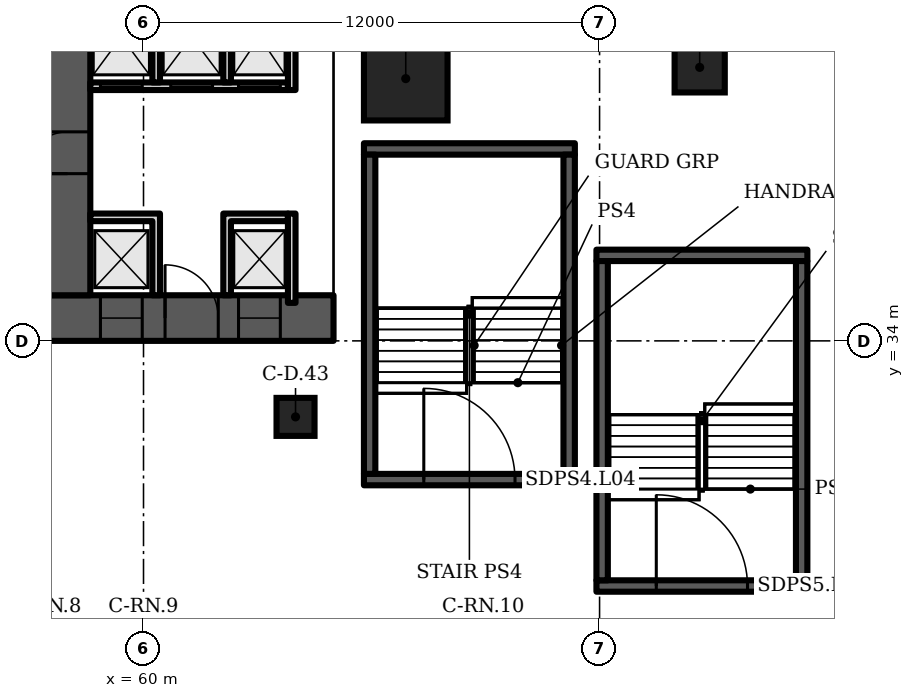
"""IFC4 building model, lengths in metres.
Left out: names, types, materials, properties, quantities, classifications, styles, units other than length and angle.
Written with IfcOpenShell. Run it as: python <this file> out.ifc"""

import sys

from ifc_helpers import new_model, si_unit, direction, frame, frame_2d, origin, origin_2d, place, context, subcontext, project, spatial, polyline, rectangle, outline, extrude, element, fill, save


model = new_model("IFC4")
c1 = context("Model", 3, precision=1e-05, world=origin(), true_north=direction((0.0, 1.0)))
c2 = subcontext(c1, "Body", "Model", "MODEL_VIEW")
j1 = project(units=[si_unit("LENGTHUNIT", "METRE"), si_unit("PLANEANGLEUNIT", "RADIAN")], contexts=[c1])
p1 = place(None, origin())
s1 = spatial("IfcSite", under=j1, at=p1, CompositionType="ELEMENT")
p2 = place(p1, origin())
s2 = spatial("IfcBuilding", under=s1, at=p2, CompositionType="ELEMENT")
p3 = place(p2, frame((0.0, 0.0, 27.5)))
s3 = spatial("IfcBuildingStorey", under=s2, at=p3, CompositionType="ELEMENT", Elevation=27.5)
p4 = place(p3, frame((66.9, 40.9, 0.0), z_axis=(0.0, 0.0, 1.0), x_axis=(1.0, 0.0, 0.0)))
e1 = element("IfcColumn", 1, at=p4, inside=s3, PredefinedType="COLUMN", context=c2, shape_type="SweptSolid", body=[
    extrude(rectangle(XDim=2.2, YDim=2.2, at=origin_2d()), origin(), (0.0, 0.0, 1.0), 5.5),
])
p5 = place(p3, frame((74.634, 41.196, 0.0), z_axis=(0.0, 0.0, 1.0), x_axis=(1.0, 0.0, 0.0)))
e2 = element("IfcColumn", 2, at=p5, inside=s3, PredefinedType="COLUMN", context=c2, shape_type="SweptSolid", body=[
    extrude(rectangle(XDim=1.32, YDim=1.32, at=origin_2d()), origin(), (0.0, 0.0, 1.0), 5.5),
])
p6 = place(p3, frame((64.0, 32.0, 0.0), z_axis=(0.0, 0.0, 1.0), x_axis=(1.0, 0.0, 0.0)))
e3 = element("IfcColumn", 3, at=p6, inside=s3, PredefinedType="COLUMN", context=c2, shape_type="SweptSolid", body=[
    extrude(rectangle(XDim=1.0, YDim=1.0, at=origin_2d()), origin(), (0.0, 0.0, 1.0), 5.5),
])
p7 = place(p3, frame((9.0, 34.6, 0.0), z_axis=(0.0, 0.0, 1.0), x_axis=(1.0, 0.0, 0.0)))
e4 = element("IfcWall", 4, at=p7, inside=s3, PredefinedType="SHEAR", context=c2, shape_type="SweptSolid", body=[
    extrude(rectangle(XDim=56.0, YDim=1.2, at=frame_2d((28.0, 0.0))), origin(), (0.0, 0.0, 1.0), 5.2),
])
p8 = place(p7, frame((3.3, 0.0, 0.0)))
e5 = element("IfcOpeningElement", 5, at=p8, cuts=e4, PredefinedType="OPENING", context=c2, shape_type="SweptSolid", body=[
    extrude(rectangle(XDim=1.0, YDim=2.1, at=frame_2d((0.5, 1.05))), frame((0.0, 0.61, 0.0), z_axis=(0.0, -1.0, 0.0), x_axis=(1.0, 0.0, 0.0)), (0.0, 0.0, 1.0), 1.22),
])
p9 = place(p7, frame((7.867, 0.0, 0.0)))
e6 = element("IfcOpeningElement", 6, at=p9, cuts=e4, PredefinedType="OPENING", context=c2, shape_type="SweptSolid", body=[
    extrude(rectangle(XDim=1.1, YDim=2.1, at=frame_2d((0.55, 1.05))), frame((0.0, 0.61, 0.0), z_axis=(0.0, -1.0, 0.0), x_axis=(1.0, 0.0, 0.0)), (0.0, 0.0, 1.0), 1.22),
])
p10 = place(p7, frame((12.033, 0.0, 0.0)))
e7 = element("IfcOpeningElement", 7, at=p10, cuts=e4, PredefinedType="OPENING", context=c2, shape_type="SweptSolid", body=[
    extrude(rectangle(XDim=1.1, YDim=2.1, at=frame_2d((0.55, 1.05))), frame((0.0, 0.61, 0.0), z_axis=(0.0, -1.0, 0.0), x_axis=(1.0, 0.0, 0.0)), (0.0, 0.0, 1.0), 1.22),
])
p11 = place(p7, frame((9.8, 0.0, 0.0)))
e8 = element("IfcOpeningElement", 8, at=p11, cuts=e4, PredefinedType="OPENING", context=c2, shape_type="SweptSolid", body=[
    extrude(rectangle(XDim=1.4, YDim=2.1, at=frame_2d((0.7, 1.05))), frame((0.0, 0.61, 0.0), z_axis=(0.0, -1.0, 0.0), x_axis=(1.0, 0.0, 0.0)), (0.0, 0.0, 1.0), 1.22),
])
p12 = place(p7, frame((14.65, 0.0, 0.0)))
e9 = element("IfcOpeningElement", 9, at=p12, cuts=e4, PredefinedType="OPENING", context=c2, shape_type="SweptSolid", body=[
    extrude(rectangle(XDim=1.2, YDim=2.1, at=frame_2d((0.6, 1.05))), frame((0.0, 0.61, 0.0), z_axis=(0.0, -1.0, 0.0), x_axis=(1.0, 0.0, 0.0)), (0.0, 0.0, 1.0), 1.22),
])
p13 = place(p7, frame((21.867, 0.0, 0.0)))
e10 = element("IfcOpeningElement", 10, at=p13, cuts=e4, PredefinedType="OPENING", context=c2, shape_type="SweptSolid", body=[
    extrude(rectangle(XDim=1.1, YDim=2.1, at=frame_2d((0.55, 1.05))), frame((0.0, 0.61, 0.0), z_axis=(0.0, -1.0, 0.0), x_axis=(1.0, 0.0, 0.0)), (0.0, 0.0, 1.0), 1.22),
])
p14 = place(p7, frame((26.033, 0.0, 0.0)))
e11 = element("IfcOpeningElement", 11, at=p14, cuts=e4, PredefinedType="OPENING", context=c2, shape_type="SweptSolid", body=[
    extrude(rectangle(XDim=1.1, YDim=2.1, at=frame_2d((0.55, 1.05))), frame((0.0, 0.61, 0.0), z_axis=(0.0, -1.0, 0.0), x_axis=(1.0, 0.0, 0.0)), (0.0, 0.0, 1.0), 1.22),
])
p15 = place(p7, frame((23.8, 0.0, 0.0)))
e12 = element("IfcOpeningElement", 12, at=p15, cuts=e4, PredefinedType="OPENING", context=c2, shape_type="SweptSolid", body=[
    extrude(rectangle(XDim=1.4, YDim=2.1, at=frame_2d((0.7, 1.05))), frame((0.0, 0.61, 0.0), z_axis=(0.0, -1.0, 0.0), x_axis=(1.0, 0.0, 0.0)), (0.0, 0.0, 1.0), 1.22),
])
p16 = place(p7, frame((28.867, 0.0, 0.0)))
e13 = element("IfcOpeningElement", 13, at=p16, cuts=e4, PredefinedType="OPENING", context=c2, shape_type="SweptSolid", body=[
    extrude(rectangle(XDim=1.1, YDim=2.1, at=frame_2d((0.55, 1.05))), frame((0.0, 0.61, 0.0), z_axis=(0.0, -1.0, 0.0), x_axis=(1.0, 0.0, 0.0)), (0.0, 0.0, 1.0), 1.22),
])
p17 = place(p7, frame((33.033, 0.0, 0.0)))
e14 = element("IfcOpeningElement", 14, at=p17, cuts=e4, PredefinedType="OPENING", context=c2, shape_type="SweptSolid", body=[
    extrude(rectangle(XDim=1.1, YDim=2.1, at=frame_2d((0.55, 1.05))), frame((0.0, 0.61, 0.0), z_axis=(0.0, -1.0, 0.0), x_axis=(1.0, 0.0, 0.0)), (0.0, 0.0, 1.0), 1.22),
])
p18 = place(p7, frame((40.15, 0.0, 0.0)))
e15 = element("IfcOpeningElement", 15, at=p18, cuts=e4, PredefinedType="OPENING", context=c2, shape_type="SweptSolid", body=[
    extrude(rectangle(XDim=1.2, YDim=2.1, at=frame_2d((0.6, 1.05))), frame((0.0, 0.61, 0.0), z_axis=(0.0, -1.0, 0.0), x_axis=(1.0, 0.0, 0.0)), (0.0, 0.0, 1.0), 1.22),
])
p19 = place(p7, frame((44.8, 0.0, 0.0)))
e16 = element("IfcOpeningElement", 16, at=p19, cuts=e4, PredefinedType="OPENING", context=c2, shape_type="SweptSolid", body=[
    extrude(rectangle(XDim=1.4, YDim=2.1, at=frame_2d((0.7, 1.05))), frame((0.0, 0.61, 0.0), z_axis=(0.0, -1.0, 0.0), x_axis=(1.0, 0.0, 0.0)), (0.0, 0.0, 1.0), 1.22),
])
p20 = place(p7, frame((49.867, 0.0, 0.0)))
e17 = element("IfcOpeningElement", 17, at=p20, cuts=e4, PredefinedType="OPENING", context=c2, shape_type="SweptSolid", body=[
    extrude(rectangle(XDim=1.1, YDim=2.1, at=frame_2d((0.55, 1.05))), frame((0.0, 0.61, 0.0), z_axis=(0.0, -1.0, 0.0), x_axis=(1.0, 0.0, 0.0)), (0.0, 0.0, 1.0), 1.22),
])
p21 = place(p7, frame((53.5, 0.0, 0.0)))
e18 = element("IfcOpeningElement", 18, at=p21, cuts=e4, PredefinedType="OPENING", context=c2, shape_type="SweptSolid", body=[
    extrude(rectangle(XDim=1.1, YDim=2.1, at=frame_2d((0.55, 1.05))), frame((0.0, 0.61, 0.0), z_axis=(0.0, -1.0, 0.0), x_axis=(1.0, 0.0, 0.0)), (0.0, 0.0, 1.0), 1.22),
])
p22 = place(p7, frame((51.567, 0.0, 0.0)))
e19 = element("IfcOpeningElement", 19, at=p22, cuts=e4, PredefinedType="OPENING", context=c2, shape_type="SweptSolid", body=[
    extrude(rectangle(XDim=1.4, YDim=2.1, at=frame_2d((0.7, 1.05))), frame((0.0, 0.61, 0.0), z_axis=(0.0, -1.0, 0.0), x_axis=(1.0, 0.0, 0.0)), (0.0, 0.0, 1.0), 1.22),
])
p23 = place(p3, frame((58.0, 35.2, 0.0), z_axis=(0.0, 0.0, 1.0), x_axis=(0.0, 1.0, 0.0)))
e20 = element("IfcWall", 20, at=p23, inside=s3, PredefinedType="SHEAR", context=c2, shape_type="SweptSolid", body=[
    extrude(rectangle(XDim=12.8, YDim=1.2, at=frame_2d((6.4, 0.0))), origin(), (0.0, 0.0, 1.0), 5.2),
])
p24 = place(p23, frame((10.134, 0.0, 0.0)))
e21 = element("IfcOpeningElement", 21, at=p24, cuts=e20, PredefinedType="OPENING", context=c2, shape_type="SweptSolid", body=[
    extrude(rectangle(XDim=1.0, YDim=2.1, at=frame_2d((0.5, 1.05))), frame((0.0, 0.61, 0.0), z_axis=(0.0, -1.0, 0.0), x_axis=(1.0, 0.0, 0.0)), (0.0, 0.0, 1.0), 1.22),
])
p25 = place(p23, frame((3.2, 0.0, 0.0)))
e22 = element("IfcOpeningElement", 22, at=p25, cuts=e20, PredefinedType="OPENING", context=c2, shape_type="SweptSolid", body=[
    extrude(rectangle(XDim=1.1, YDim=2.1, at=frame_2d((0.55, 1.05))), frame((0.0, 0.61, 0.0), z_axis=(0.0, -1.0, 0.0), x_axis=(1.0, 0.0, 0.0)), (0.0, 0.0, 1.0), 1.22),
])
p26 = place(p3, frame((58.6, 40.7, 0.0), z_axis=(0.0, 0.0, 1.0), x_axis=(1.0, 0.0, 0.0)))
e23 = element("IfcWall", 23, at=p26, inside=s3, PredefinedType="PARTITIONING", context=c2, shape_type="SweptSolid", body=[
    extrude(rectangle(XDim=5.2, YDim=0.2, at=frame_2d((2.6, 0.0))), origin(), (0.0, 0.0, 1.0), 5.2),
])
p27 = place(p26, frame((0.267, 0.0, 0.0)))
e24 = element("IfcOpeningElement", 24, at=p27, cuts=e23, PredefinedType="OPENING", context=c2, shape_type="SweptSolid", body=[
    extrude(rectangle(XDim=1.1, YDim=2.1, at=frame_2d((0.55, 1.05))), frame((0.0, 0.11, 0.0), z_axis=(0.0, -1.0, 0.0), x_axis=(1.0, 0.0, 0.0)), (0.0, 0.0, 1.0), 0.22),
])
p28 = place(p26, frame((2.117, 0.0, 0.0)))
e25 = element("IfcOpeningElement", 25, at=p28, cuts=e23, PredefinedType="OPENING", context=c2, shape_type="SweptSolid", body=[
    extrude(rectangle(XDim=1.1, YDim=2.1, at=frame_2d((0.55, 1.05))), frame((0.0, 0.11, 0.0), z_axis=(0.0, -1.0, 0.0), x_axis=(1.0, 0.0, 0.0)), (0.0, 0.0, 1.0), 0.22),
])
p29 = place(p26, frame((3.9, 0.0, 0.0)))
e26 = element("IfcOpeningElement", 26, at=p29, cuts=e23, PredefinedType="OPENING", context=c2, shape_type="SweptSolid", body=[
    extrude(rectangle(XDim=1.1, YDim=2.1, at=frame_2d((0.55, 1.05))), frame((0.0, 0.11, 0.0), z_axis=(0.0, -1.0, 0.0), x_axis=(1.0, 0.0, 0.0)), (0.0, 0.0, 1.0), 0.22),
])
p30 = place(p3, frame((0.0, 0.0, -0.0)))
e27 = element("IfcWall", 27, at=p30, inside=s3, PredefinedType="PARTITIONING", context=c2, shape_type="SweptSolid", body=[
    extrude(outline(polyline([(60.233, 37.15), (58.6, 37.15), (58.6, 37.35), (60.233, 37.35), (60.433, 37.35), (60.433, 35.2), (60.233, 35.2), (60.233, 37.15)])), origin(), (0.0, 0.0, 1.0), 5.2),
])
p31 = place(p3, frame((0.0, 0.0, -0.0)))
e28 = element("IfcWall", 28, at=p31, inside=s3, PredefinedType="PARTITIONING", context=c2, shape_type="SweptSolid", body=[
    extrude(outline(polyline([(62.1, 37.35), (62.3, 37.35), (63.8, 37.35), (63.8, 37.15), (62.3, 37.15), (62.3, 35.2), (62.1, 35.2), (62.1, 37.35)])), origin(), (0.0, 0.0, 1.0), 5.2),
])
p32 = place(p3, frame((0.0, 0.0, -0.0)))
e29 = element("IfcWall", 29, at=p32, inside=s3, PredefinedType="PARTITIONING", context=c2, shape_type="SweptSolid", body=[
    extrude(outline(polyline([(60.433, 40.8), (60.233, 40.8), (60.233, 43.8), (58.6, 43.8), (58.6, 44.0), (63.8, 44.0), (63.8, 43.8), (62.3, 43.8), (62.3, 40.8), (62.1, 40.8), (62.1, 43.8), (60.433, 43.8), (60.433, 40.8)])), origin(), (0.0, 0.0, 1.0), 5.2),
])
p33 = place(p3, frame((63.9, 35.0, 0.0), z_axis=(0.0, 0.0, 1.0), x_axis=(0.0, 1.0, 0.0)))
e30 = element("IfcWall", 30, at=p33, inside=s3, PredefinedType="PARTITIONING", context=c2, shape_type="SweptSolid", body=[
    extrude(rectangle(XDim=2.35, YDim=0.2, at=frame_2d((1.175, 0.0))), origin(), (0.0, 0.0, 1.0), 5.2),
])
p34 = place(p3, frame((63.9, 40.6, 0.0), z_axis=(0.0, 0.0, 1.0), x_axis=(0.0, 1.0, 0.0)))
e31 = element("IfcWall", 31, at=p34, inside=s3, PredefinedType="PARTITIONING", context=c2, shape_type="SweptSolid", body=[
    extrude(rectangle(XDim=3.4, YDim=0.2, at=frame_2d((1.7, 0.0))), origin(), (0.0, 0.0, 1.0), 5.2),
])
p35 = place(p3, frame((65.8, 30.35, 0.0), z_axis=(0.0, 0.0, 1.0), x_axis=(1.0, 0.0, 0.0)))
e32 = element("IfcWall", 32, at=p35, inside=s3, PredefinedType="SHEAR", context=c2, shape_type="SweptSolid", body=[
    extrude(rectangle(XDim=5.55, YDim=0.3, at=frame_2d((2.775, 0.0))), origin(), (0.0, 0.0, 1.0), 5.2),
])
p36 = place(p35, frame((1.575, 0.0, 0.0)))
e33 = element("IfcOpeningElement", 33, at=p36, cuts=e32, PredefinedType="OPENING", context=c2, shape_type="SweptSolid", body=[
    extrude(rectangle(XDim=2.4, YDim=2.1, at=frame_2d((1.2, 1.05))), frame((0.0, 0.16, 0.0), z_axis=(0.0, -1.0, 0.0), x_axis=(1.0, 0.0, 0.0)), (0.0, 0.0, 1.0), 0.32),
])
p37 = place(p3, frame((65.8, 39.05, 0.0), z_axis=(0.0, 0.0, 1.0), x_axis=(1.0, 0.0, 0.0)))
e34 = element("IfcWall", 34, at=p37, inside=s3, PredefinedType="SHEAR", context=c2, shape_type="SweptSolid", body=[
    extrude(rectangle(XDim=5.55, YDim=0.3, at=frame_2d((2.775, 0.0))), origin(), (0.0, 0.0, 1.0), 5.2),
])
for number, where, z_axis, x_axis in (
    (35, (65.95, 30.5, 0.0), (0.0, 0.0, 1.0), (0.0, 1.0, 0.0)),
    (36, (71.2, 30.5, 0.0), (0.0, 0.0, 1.0), (0.0, 1.0, 0.0)),
):
    element("IfcWall", number, at=place(p3, frame(where, z_axis=z_axis, x_axis=x_axis)), inside=s3, PredefinedType="SHEAR", context=c2, shape_type="SweptSolid", body=[
        extrude(rectangle(XDim=8.4, YDim=0.3, at=frame_2d((4.2, 0.0))), origin(), (0.0, 0.0, 1.0), 5.2),
    ])
p38 = place(p3, frame((71.917, 27.55, 0.0), z_axis=(0.0, 0.0, 1.0), x_axis=(1.0, 0.0, 0.0)))
e37 = element("IfcWall", 37, at=p38, inside=s3, PredefinedType="SHEAR", context=c2, shape_type="SweptSolid", body=[
    extrude(rectangle(XDim=5.55, YDim=0.3, at=frame_2d((2.775, 0.0))), origin(), (0.0, 0.0, 1.0), 5.2),
])
p39 = place(p38, frame((1.575, 0.0, 0.0)))
e38 = element("IfcOpeningElement", 38, at=p39, cuts=e37, PredefinedType="OPENING", context=c2, shape_type="SweptSolid", body=[
    extrude(rectangle(XDim=2.4, YDim=2.1, at=frame_2d((1.2, 1.05))), frame((0.0, 0.16, 0.0), z_axis=(0.0, -1.0, 0.0), x_axis=(1.0, 0.0, 0.0)), (0.0, 0.0, 1.0), 0.32),
])
p40 = place(p3, frame((71.917, 36.25, 0.0), z_axis=(0.0, 0.0, 1.0), x_axis=(1.0, 0.0, 0.0)))
e39 = element("IfcWall", 39, at=p40, inside=s3, PredefinedType="SHEAR", context=c2, shape_type="SweptSolid", body=[
    extrude(rectangle(XDim=5.55, YDim=0.3, at=frame_2d((2.775, 0.0))), origin(), (0.0, 0.0, 1.0), 5.2),
])
for number, where, z_axis, x_axis in (
    (40, (72.067, 27.7, 0.0), (0.0, 0.0, 1.0), (0.0, 1.0, 0.0)),
    (41, (77.317, 27.7, 0.0), (0.0, 0.0, 1.0), (0.0, 1.0, 0.0)),
):
    element("IfcWall", number, at=place(p3, frame(where, z_axis=z_axis, x_axis=x_axis)), inside=s3, PredefinedType="SHEAR", context=c2, shape_type="SweptSolid", body=[
        extrude(rectangle(XDim=8.4, YDim=0.3, at=frame_2d((4.2, 0.0))), origin(), (0.0, 0.0, 1.0), 5.2),
    ])
p41 = place(p20, origin())
e42 = element("IfcDoor", 42, at=p41, inside=s3, OperationType="DOUBLE_DOOR_SLIDING", PredefinedType="DOOR", context=c2, shape_type="SweptSolid", body=[
    extrude(rectangle(XDim=1.1, YDim=2.1, at=frame_2d((0.55, 1.05))), frame((0.0, 0.025, 0.0), z_axis=(0.0, -1.0, 0.0), x_axis=(1.0, 0.0, 0.0)), (0.0, 0.0, 1.0), 0.05),
])
fill(e17, e42)
p42 = place(p21, origin())
e43 = element("IfcDoor", 43, at=p42, inside=s3, OperationType="DOUBLE_DOOR_SLIDING", PredefinedType="DOOR", context=c2, shape_type="SweptSolid", body=[
    extrude(rectangle(XDim=1.1, YDim=2.1, at=frame_2d((0.55, 1.05))), frame((0.0, 0.025, 0.0), z_axis=(0.0, -1.0, 0.0), x_axis=(1.0, 0.0, 0.0)), (0.0, 0.0, 1.0), 0.05),
])
fill(e18, e43)
p43 = place(p22, origin())
e44 = element("IfcDoor", 44, at=p43, inside=s3, OperationType="DOUBLE_DOOR_SINGLE_SWING", PredefinedType="DOOR", context=c2, shape_type="SweptSolid", body=[
    extrude(rectangle(XDim=1.4, YDim=2.1, at=frame_2d((0.7, 1.05))), frame((0.0, 0.025, 0.0), z_axis=(0.0, -1.0, 0.0), x_axis=(1.0, 0.0, 0.0)), (0.0, 0.0, 1.0), 0.05),
])
fill(e19, e44)
p44 = place(p27, origin())
e45 = element("IfcDoor", 45, at=p44, inside=s3, OperationType="DOUBLE_DOOR_SLIDING", PredefinedType="DOOR", context=c2, shape_type="SweptSolid", body=[
    extrude(rectangle(XDim=1.1, YDim=2.1, at=frame_2d((0.55, 1.05))), frame((0.0, 0.025, 0.0), z_axis=(0.0, -1.0, 0.0), x_axis=(1.0, 0.0, 0.0)), (0.0, 0.0, 1.0), 0.05),
])
fill(e24, e45)
p45 = place(p28, origin())
e46 = element("IfcDoor", 46, at=p45, inside=s3, OperationType="DOUBLE_DOOR_SLIDING", PredefinedType="DOOR", context=c2, shape_type="SweptSolid", body=[
    extrude(rectangle(XDim=1.1, YDim=2.1, at=frame_2d((0.55, 1.05))), frame((0.0, 0.025, 0.0), z_axis=(0.0, -1.0, 0.0), x_axis=(1.0, 0.0, 0.0)), (0.0, 0.0, 1.0), 0.05),
])
fill(e25, e46)
p46 = place(p29, origin())
e47 = element("IfcDoor", 47, at=p46, inside=s3, OperationType="DOUBLE_DOOR_SLIDING", PredefinedType="DOOR", context=c2, shape_type="SweptSolid", body=[
    extrude(rectangle(XDim=1.1, YDim=2.1, at=frame_2d((0.55, 1.05))), frame((0.0, 0.025, 0.0), z_axis=(0.0, -1.0, 0.0), x_axis=(1.0, 0.0, 0.0)), (0.0, 0.0, 1.0), 0.05),
])
fill(e26, e47)
p47 = place(p25, origin())
e48 = element("IfcDoor", 48, at=p47, inside=s3, OperationType="SINGLE_SWING_LEFT", PredefinedType="DOOR", context=c2, shape_type="SweptSolid", body=[
    extrude(rectangle(XDim=1.1, YDim=2.1, at=frame_2d((0.55, 1.05))), frame((0.0, 0.025, 0.0), z_axis=(0.0, -1.0, 0.0), x_axis=(1.0, 0.0, 0.0)), (0.0, 0.0, 1.0), 0.05),
])
fill(e22, e48)
p48 = place(p36, origin())
e49 = element("IfcDoor", 49, at=p48, inside=s3, OperationType="DOUBLE_DOOR_SINGLE_SWING", PredefinedType="DOOR", context=c2, shape_type="SweptSolid", body=[
    extrude(rectangle(XDim=2.4, YDim=2.1, at=frame_2d((1.2, 1.05))), frame((0.0, 0.025, 0.0), z_axis=(0.0, -1.0, 0.0), x_axis=(1.0, 0.0, 0.0)), (0.0, 0.0, 1.0), 0.05),
])
fill(e33, e49)
p49 = place(p39, origin())
e50 = element("IfcDoor", 50, at=p49, inside=s3, OperationType="DOUBLE_DOOR_SINGLE_SWING", PredefinedType="DOOR", context=c2, shape_type="SweptSolid", body=[
    extrude(rectangle(XDim=2.4, YDim=2.1, at=frame_2d((1.2, 1.05))), frame((0.0, 0.025, 0.0), z_axis=(0.0, -1.0, 0.0), x_axis=(1.0, 0.0, 0.0)), (0.0, 0.0, 1.0), 0.05),
])
fill(e38, e50)
save(model, sys.argv[1])
